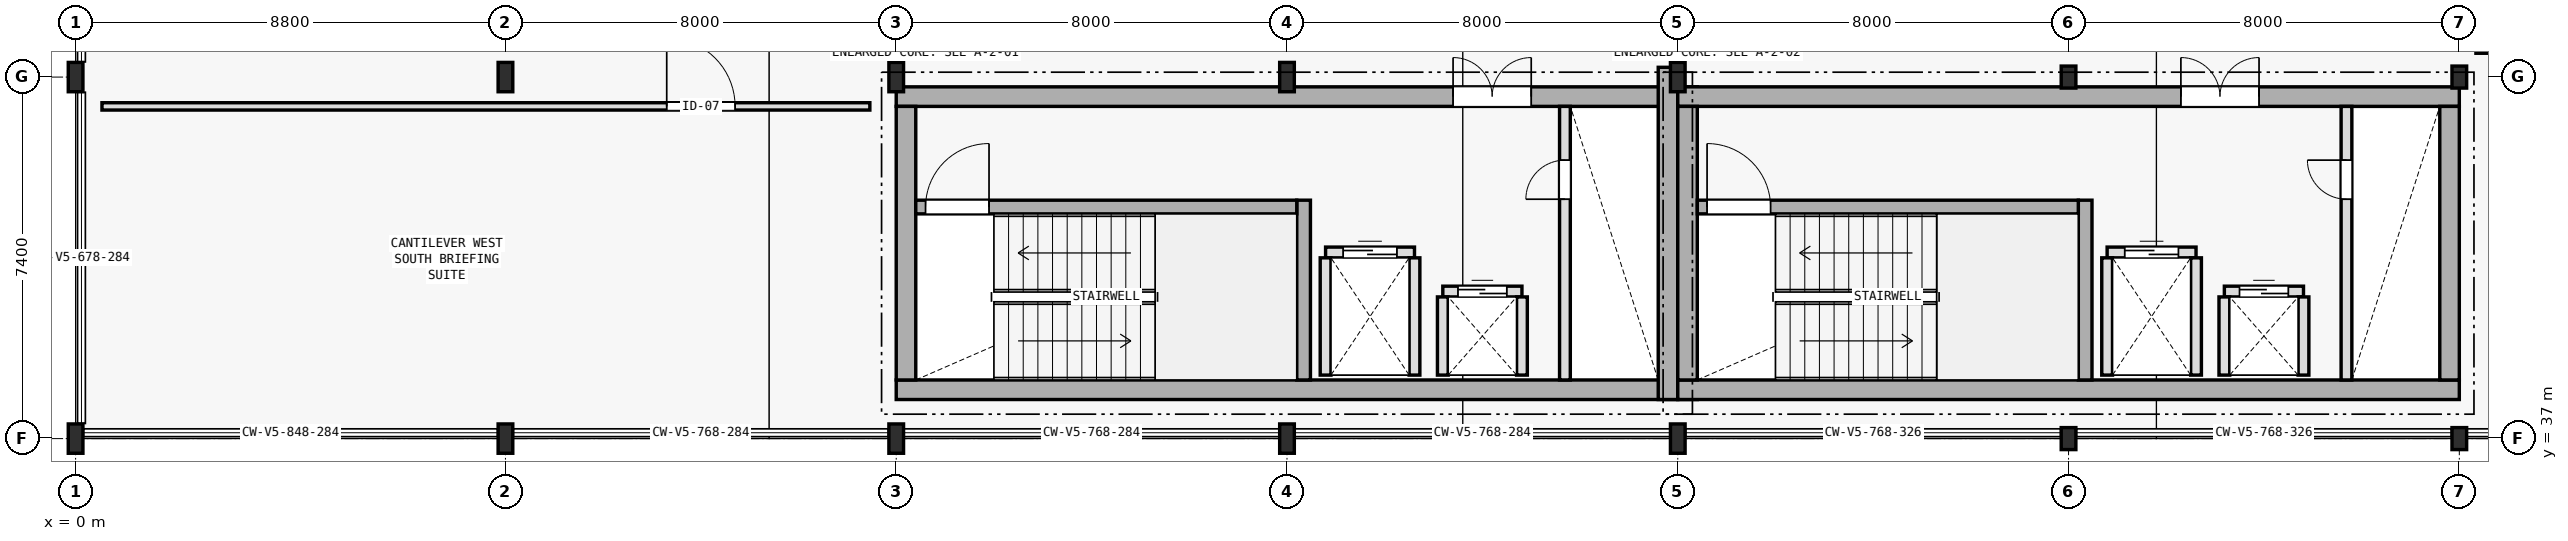
"""IFC4 building model, lengths in metres.
Left out: names, types, materials, properties, quantities, classifications, styles, units other than length and angle.
Written with IfcOpenShell. Run it as: python <this file> out.ifc"""

import sys

from ifc_helpers import new_model, si_unit, direction, frame, frame_2d, origin, origin_2d, place, context, subcontext, project, spatial, rectangle, i_section, extrude, element, fill, save


model = new_model("IFC4")
c1 = context("Model", 3, precision=1e-05, world=origin(), true_north=direction((0.0, 1.0)))
c2 = subcontext(c1, "Body", "Model", "MODEL_VIEW")
j1 = project(units=[si_unit("LENGTHUNIT", "METRE"), si_unit("PLANEANGLEUNIT", "RADIAN")], contexts=[c1])
p1 = place(None, origin())
s1 = spatial("IfcSite", under=j1, at=p1, CompositionType="ELEMENT")
p2 = place(p1, origin())
s2 = spatial("IfcBuilding", under=s1, at=p2, CompositionType="ELEMENT")
p3 = place(p2, frame((0.0, 0.0, 14.1)))
s3 = spatial("IfcBuildingStorey", under=s2, at=p3, CompositionType="ELEMENT", Elevation=14.1)
p4 = place(p3, frame((16.8, 38.0, 0.0), z_axis=(0.0, 0.0, 1.0), x_axis=(1.0, 0.0, 0.0)))
e1 = element("IfcWall", 1, at=p4, inside=s3, PredefinedType="SHEAR", context=c2, shape_type="SweptSolid", body=[
    extrude(rectangle(XDim=16.4, YDim=0.4, at=frame_2d((8.2, 0.0))), origin(), (0.0, 0.0, 1.0), 3.995),
])
p5 = place(p3, frame((16.8, 44.0, 0.0), z_axis=(0.0, 0.0, 1.0), x_axis=(1.0, 0.0, 0.0)))
e2 = element("IfcWall", 2, at=p5, inside=s3, PredefinedType="SHEAR", context=c2, shape_type="SweptSolid", body=[
    extrude(rectangle(XDim=16.4, YDim=0.4, at=frame_2d((8.2, 0.0))), origin(), (0.0, 0.0, 1.0), 3.995),
])
p6 = place(p5, frame((11.4, 0.0, 0.0)))
e3 = element("IfcOpeningElement", 3, at=p6, cuts=e2, PredefinedType="OPENING", context=c2, shape_type="SweptSolid", body=[
    extrude(rectangle(XDim=1.6, YDim=2.2, at=frame_2d((0.8, 1.1))), frame((0.0, 0.21, 0.0), z_axis=(0.0, -1.0, 0.0), x_axis=(1.0, 0.0, 0.0)), (0.0, 0.0, 1.0), 0.42),
])
p7 = place(p3, frame((17.0, 38.2, 0.0), z_axis=(0.0, 0.0, 1.0), x_axis=(0.0, 1.0, 0.0)))
e4 = element("IfcWall", 4, at=p7, inside=s3, PredefinedType="SHEAR", context=c2, shape_type="SweptSolid", body=[
    extrude(rectangle(XDim=5.6, YDim=0.4, at=frame_2d((2.8, 0.0))), origin(), (0.0, 0.0, 1.0), 3.995),
])
p8 = place(p3, frame((32.6, 37.8, 0.0), z_axis=(0.0, 0.0, 1.0), x_axis=(0.0, 1.0, 0.0)))
e5 = element("IfcWall", 5, at=p8, inside=s3, PredefinedType="SHEAR", context=c2, shape_type="SweptSolid", body=[
    extrude(rectangle(XDim=6.8, YDim=0.4, at=frame_2d((3.4, 0.0))), origin(), (0.0, 0.0, 1.0), 3.995),
])
p9 = place(p3, frame((25.14, 38.2, 0.0), z_axis=(0.0, 0.0, 1.0), x_axis=(0.0, 1.0, 0.0)))
e6 = element("IfcWall", 6, at=p9, inside=s3, PredefinedType="SHEAR", context=c2, shape_type="SweptSolid", body=[
    extrude(rectangle(XDim=3.68, YDim=0.28, at=frame_2d((1.84, 0.0))), origin(), (0.0, 0.0, 1.0), 3.995),
])
p10 = place(p3, frame((17.2, 41.74, 0.0), z_axis=(0.0, 0.0, 1.0), x_axis=(1.0, 0.0, 0.0)))
e7 = element("IfcWall", 7, at=p10, inside=s3, PredefinedType="SHEAR", context=c2, shape_type="SweptSolid", body=[
    extrude(rectangle(XDim=7.8, YDim=0.28, at=frame_2d((3.9, 0.0))), origin(), (0.0, 0.0, 1.0), 3.995),
])
p11 = place(p10, frame((0.2, 0.0, 0.0)))
e8 = element("IfcOpeningElement", 8, at=p11, cuts=e7, PredefinedType="OPENING", context=c2, shape_type="SweptSolid", body=[
    extrude(rectangle(XDim=1.3, YDim=2.2, at=frame_2d((0.65, 1.1))), frame((0.0, 0.15, 0.0), z_axis=(0.0, -1.0, 0.0), x_axis=(1.0, 0.0, 0.0)), (0.0, 0.0, 1.0), 0.3),
])
p12 = place(p3, frame((32.8, 38.0, 0.0), z_axis=(0.0, 0.0, 1.0), x_axis=(1.0, 0.0, 0.0)))
e9 = element("IfcWall", 9, at=p12, inside=s3, PredefinedType="SHEAR", context=c2, shape_type="SweptSolid", body=[
    extrude(rectangle(XDim=16.0, YDim=0.4, at=frame_2d((8.0, 0.0))), origin(), (0.0, 0.0, 1.0), 3.995),
])
p13 = place(p3, frame((32.8, 44.0, 0.0), z_axis=(0.0, 0.0, 1.0), x_axis=(1.0, 0.0, 0.0)))
e10 = element("IfcWall", 10, at=p13, inside=s3, PredefinedType="SHEAR", context=c2, shape_type="SweptSolid", body=[
    extrude(rectangle(XDim=16.0, YDim=0.4, at=frame_2d((8.0, 0.0))), origin(), (0.0, 0.0, 1.0), 3.995),
])
p14 = place(p13, frame((10.3, 0.0, 0.0)))
e11 = element("IfcOpeningElement", 11, at=p14, cuts=e10, PredefinedType="OPENING", context=c2, shape_type="SweptSolid", body=[
    extrude(rectangle(XDim=1.6, YDim=2.2, at=frame_2d((0.8, 1.1))), frame((0.0, 0.21, 0.0), z_axis=(0.0, -1.0, 0.0), x_axis=(1.0, 0.0, 0.0)), (0.0, 0.0, 1.0), 0.42),
])
for number, where, z_axis, x_axis in (
    (12, (33.0, 38.2, 0.0), (0.0, 0.0, 1.0), (0.0, 1.0, 0.0)),
    (13, (48.6, 38.2, 0.0), (0.0, 0.0, 1.0), (0.0, 1.0, 0.0)),
):
    element("IfcWall", number, at=place(p3, frame(where, z_axis=z_axis, x_axis=x_axis)), inside=s3, PredefinedType="SHEAR", context=c2, shape_type="SweptSolid", body=[
        extrude(rectangle(XDim=5.6, YDim=0.4, at=frame_2d((2.8, 0.0))), origin(), (0.0, 0.0, 1.0), 3.995),
    ])
p15 = place(p3, frame((41.14, 38.2, 0.0), z_axis=(0.0, 0.0, 1.0), x_axis=(0.0, 1.0, 0.0)))
e14 = element("IfcWall", 14, at=p15, inside=s3, PredefinedType="SHEAR", context=c2, shape_type="SweptSolid", body=[
    extrude(rectangle(XDim=3.68, YDim=0.28, at=frame_2d((1.84, 0.0))), origin(), (0.0, 0.0, 1.0), 3.995),
])
p16 = place(p3, frame((33.2, 41.74, 0.0), z_axis=(0.0, 0.0, 1.0), x_axis=(1.0, 0.0, 0.0)))
e15 = element("IfcWall", 15, at=p16, inside=s3, PredefinedType="SHEAR", context=c2, shape_type="SweptSolid", body=[
    extrude(rectangle(XDim=7.8, YDim=0.28, at=frame_2d((3.9, 0.0))), origin(), (0.0, 0.0, 1.0), 3.995),
])
p17 = place(p16, frame((0.2, 0.0, 0.0)))
e16 = element("IfcOpeningElement", 16, at=p17, cuts=e15, PredefinedType="OPENING", context=c2, shape_type="SweptSolid", body=[
    extrude(rectangle(XDim=1.3, YDim=2.2, at=frame_2d((0.65, 1.1))), frame((0.0, 0.15, 0.0), z_axis=(0.0, -1.0, 0.0), x_axis=(1.0, 0.0, 0.0)), (0.0, 0.0, 1.0), 0.3),
])
for number, where, z_axis, x_axis in (
    (17, (0.0, 37.0, 0.0), (0.0, 0.0, 1.0), (1.0, 0.0, 0.0)),
    (18, (0.0, 44.4, 0.0), (0.0, 0.0, 1.0), (1.0, 0.0, 0.0)),
    (19, (8.8, 37.0, 0.0), (0.0, 0.0, 1.0), (1.0, 0.0, 0.0)),
    (20, (8.8, 44.4, 0.0), (0.0, 0.0, 1.0), (1.0, 0.0, 0.0)),
    (21, (16.8, 37.0, 0.0), (0.0, 0.0, 1.0), (1.0, 0.0, 0.0)),
    (22, (16.8, 44.4, 0.0), (0.0, 0.0, 1.0), (1.0, 0.0, 0.0)),
    (23, (24.8, 37.0, 0.0), (0.0, 0.0, 1.0), (1.0, 0.0, 0.0)),
    (24, (24.8, 44.4, 0.0), (0.0, 0.0, 1.0), (1.0, 0.0, 0.0)),
    (25, (32.8, 37.0, 0.0), (0.0, 0.0, 1.0), (1.0, 0.0, 0.0)),
    (26, (32.8, 44.4, 0.0), (0.0, 0.0, 1.0), (1.0, 0.0, 0.0)),
):
    element("IfcColumn", number, at=place(p3, frame(where, z_axis=z_axis, x_axis=x_axis)), inside=s3, PredefinedType="COLUMN", context=c2, shape_type="SweptSolid", body=[
        extrude(i_section(OverallWidth=0.3, OverallDepth=0.6, WebThickness=0.015, FlangeThickness=0.03, FilletRadius=0.027, at=origin_2d()), origin(), (0.0, 0.0, 1.0), 4.0),
    ])
for number, where, z_axis, x_axis in (
    (27, (40.8, 37.0, 0.0), (0.0, 0.0, 1.0), (1.0, 0.0, 0.0)),
    (28, (40.8, 44.4, 0.0), (0.0, 0.0, 1.0), (1.0, 0.0, 0.0)),
    (29, (48.8, 37.0, 0.0), (0.0, 0.0, 1.0), (1.0, 0.0, 0.0)),
    (30, (48.8, 44.4, 0.0), (0.0, 0.0, 1.0), (1.0, 0.0, 0.0)),
):
    element("IfcColumn", number, at=place(p3, frame(where, z_axis=z_axis, x_axis=x_axis)), inside=s3, PredefinedType="COLUMN", context=c2, shape_type="SweptSolid", body=[
        extrude(i_section(OverallWidth=0.3, OverallDepth=0.45, WebThickness=0.014, FlangeThickness=0.026, FilletRadius=0.027, at=origin_2d()), origin(), (0.0, 0.0, 1.0), 4.0),
    ])
p18 = place(p3, frame((25.59, 40.81, 0.0), z_axis=(0.0, 0.0, 1.0), x_axis=(1.0, 0.0, 0.0)))
e31 = element("IfcWall", 31, at=p18, inside=s3, PredefinedType="PLUMBINGWALL", context=c2, shape_type="SweptSolid", body=[
    extrude(rectangle(XDim=1.82, YDim=0.22, at=frame_2d((0.91, 0.0))), origin(), (0.0, 0.0, 1.0), 3.72),
])
p19 = place(p18, frame((0.36, 0.0, 0.0)))
e32 = element("IfcOpeningElement", 32, at=p19, cuts=e31, PredefinedType="OPENING", context=c2, shape_type="SweptSolid", body=[
    extrude(rectangle(XDim=1.1, YDim=2.2, at=frame_2d((0.55, 1.1))), frame((0.0, 0.12, 0.0), z_axis=(0.0, -1.0, 0.0), x_axis=(1.0, 0.0, 0.0)), (0.0, 0.0, 1.0), 0.24),
])
for number, where, z_axis, x_axis in (
    (33, (25.59, 38.3, 0.0), (0.0, 0.0, 1.0), (0.0, 1.0, 0.0)),
    (34, (27.41, 38.3, 0.0), (0.0, 0.0, 1.0), (0.0, 1.0, 0.0)),
):
    element("IfcWall", number, at=place(p3, frame(where, z_axis=z_axis, x_axis=x_axis)), inside=s3, PredefinedType="PLUMBINGWALL", context=c2, shape_type="SweptSolid", body=[
        extrude(rectangle(XDim=2.4, YDim=0.22, at=frame_2d((1.2, 0.0))), origin(), (0.0, 0.0, 1.0), 3.72),
    ])
p20 = place(p3, frame((27.99, 40.01, 0.0), z_axis=(0.0, 0.0, 1.0), x_axis=(1.0, 0.0, 0.0)))
e35 = element("IfcWall", 35, at=p20, inside=s3, PredefinedType="PLUMBINGWALL", context=c2, shape_type="SweptSolid", body=[
    extrude(rectangle(XDim=1.62, YDim=0.22, at=frame_2d((0.81, 0.0))), origin(), (0.0, 0.0, 1.0), 3.72),
])
p21 = place(p20, frame((0.31, 0.0, 0.0)))
e36 = element("IfcOpeningElement", 36, at=p21, cuts=e35, PredefinedType="OPENING", context=c2, shape_type="SweptSolid", body=[
    extrude(rectangle(XDim=1.0, YDim=2.2, at=frame_2d((0.5, 1.1))), frame((0.0, 0.12, 0.0), z_axis=(0.0, -1.0, 0.0), x_axis=(1.0, 0.0, 0.0)), (0.0, 0.0, 1.0), 0.24),
])
for number, where, z_axis, x_axis in (
    (37, (27.99, 38.3, 0.0), (0.0, 0.0, 1.0), (0.0, 1.0, 0.0)),
    (38, (29.61, 38.3, 0.0), (0.0, 0.0, 1.0), (0.0, 1.0, 0.0)),
):
    element("IfcWall", number, at=place(p3, frame(where, z_axis=z_axis, x_axis=x_axis)), inside=s3, PredefinedType="PLUMBINGWALL", context=c2, shape_type="SweptSolid", body=[
        extrude(rectangle(XDim=1.6, YDim=0.22, at=frame_2d((0.8, 0.0))), origin(), (0.0, 0.0, 1.0), 3.72),
    ])
p22 = place(p3, frame((30.49, 38.2, 0.0), z_axis=(0.0, 0.0, 1.0), x_axis=(0.0, 1.0, 0.0)))
e39 = element("IfcWall", 39, at=p22, inside=s3, PredefinedType="PLUMBINGWALL", context=c2, shape_type="SweptSolid", body=[
    extrude(rectangle(XDim=5.6, YDim=0.22, at=frame_2d((2.8, 0.0))), origin(), (0.0, 0.0, 1.0), 3.72),
])
p23 = place(p22, frame((3.7, 0.0, 0.0)))
e40 = element("IfcOpeningElement", 40, at=p23, cuts=e39, PredefinedType="OPENING", context=c2, shape_type="SweptSolid", body=[
    extrude(rectangle(XDim=0.8, YDim=2.1, at=frame_2d((0.4, 1.05))), frame((0.0, 0.12, 0.0), z_axis=(0.0, -1.0, 0.0), x_axis=(1.0, 0.0, 0.0)), (0.0, 0.0, 1.0), 0.24),
])
p24 = place(p3, frame((41.59, 40.81, 0.0), z_axis=(0.0, 0.0, 1.0), x_axis=(1.0, 0.0, 0.0)))
e41 = element("IfcWall", 41, at=p24, inside=s3, PredefinedType="PLUMBINGWALL", context=c2, shape_type="SweptSolid", body=[
    extrude(rectangle(XDim=1.82, YDim=0.22, at=frame_2d((0.91, 0.0))), origin(), (0.0, 0.0, 1.0), 3.72),
])
p25 = place(p24, frame((0.36, 0.0, 0.0)))
e42 = element("IfcOpeningElement", 42, at=p25, cuts=e41, PredefinedType="OPENING", context=c2, shape_type="SweptSolid", body=[
    extrude(rectangle(XDim=1.1, YDim=2.2, at=frame_2d((0.55, 1.1))), frame((0.0, 0.12, 0.0), z_axis=(0.0, -1.0, 0.0), x_axis=(1.0, 0.0, 0.0)), (0.0, 0.0, 1.0), 0.24),
])
for number, where, z_axis, x_axis in (
    (43, (41.59, 38.3, 0.0), (0.0, 0.0, 1.0), (0.0, 1.0, 0.0)),
    (44, (43.41, 38.3, 0.0), (0.0, 0.0, 1.0), (0.0, 1.0, 0.0)),
):
    element("IfcWall", number, at=place(p3, frame(where, z_axis=z_axis, x_axis=x_axis)), inside=s3, PredefinedType="PLUMBINGWALL", context=c2, shape_type="SweptSolid", body=[
        extrude(rectangle(XDim=2.4, YDim=0.22, at=frame_2d((1.2, 0.0))), origin(), (0.0, 0.0, 1.0), 3.72),
    ])
p26 = place(p3, frame((43.99, 40.01, 0.0), z_axis=(0.0, 0.0, 1.0), x_axis=(1.0, 0.0, 0.0)))
e45 = element("IfcWall", 45, at=p26, inside=s3, PredefinedType="PLUMBINGWALL", context=c2, shape_type="SweptSolid", body=[
    extrude(rectangle(XDim=1.62, YDim=0.22, at=frame_2d((0.81, 0.0))), origin(), (0.0, 0.0, 1.0), 3.72),
])
p27 = place(p26, frame((0.31, 0.0, 0.0)))
e46 = element("IfcOpeningElement", 46, at=p27, cuts=e45, PredefinedType="OPENING", context=c2, shape_type="SweptSolid", body=[
    extrude(rectangle(XDim=1.0, YDim=2.2, at=frame_2d((0.5, 1.1))), frame((0.0, 0.12, 0.0), z_axis=(0.0, -1.0, 0.0), x_axis=(1.0, 0.0, 0.0)), (0.0, 0.0, 1.0), 0.24),
])
for number, where, z_axis, x_axis in (
    (47, (43.99, 38.3, 0.0), (0.0, 0.0, 1.0), (0.0, 1.0, 0.0)),
    (48, (45.61, 38.3, 0.0), (0.0, 0.0, 1.0), (0.0, 1.0, 0.0)),
):
    element("IfcWall", number, at=place(p3, frame(where, z_axis=z_axis, x_axis=x_axis)), inside=s3, PredefinedType="PLUMBINGWALL", context=c2, shape_type="SweptSolid", body=[
        extrude(rectangle(XDim=1.6, YDim=0.22, at=frame_2d((0.8, 0.0))), origin(), (0.0, 0.0, 1.0), 3.72),
    ])
p28 = place(p3, frame((46.49, 38.2, 0.0), z_axis=(0.0, 0.0, 1.0), x_axis=(0.0, 1.0, 0.0)))
e49 = element("IfcWall", 49, at=p28, inside=s3, PredefinedType="PLUMBINGWALL", context=c2, shape_type="SweptSolid", body=[
    extrude(rectangle(XDim=5.6, YDim=0.22, at=frame_2d((2.8, 0.0))), origin(), (0.0, 0.0, 1.0), 3.72),
])
p29 = place(p28, frame((3.7, 0.0, 0.0)))
e50 = element("IfcOpeningElement", 50, at=p29, cuts=e49, PredefinedType="OPENING", context=c2, shape_type="SweptSolid", body=[
    extrude(rectangle(XDim=0.8, YDim=2.1, at=frame_2d((0.4, 1.05))), frame((0.0, 0.12, 0.0), z_axis=(0.0, -1.0, 0.0), x_axis=(1.0, 0.0, 0.0)), (0.0, 0.0, 1.0), 0.24),
])
p30 = place(p3, frame((0.54, 43.8, 0.0), z_axis=(0.0, 0.0, 1.0), x_axis=(1.0, 0.0, 0.0)))
e51 = element("IfcWall", 51, at=p30, inside=s3, PredefinedType="PARTITIONING", context=c2, shape_type="SweptSolid", body=[
    extrude(rectangle(XDim=15.72, YDim=0.15, at=frame_2d((7.86, 0.0))), origin(), (0.0, 0.0, 1.0), 3.245),
])
p31 = place(p30, frame((11.562, 0.0, 0.0)))
e52 = element("IfcOpeningElement", 52, at=p31, cuts=e51, PredefinedType="OPENING", context=c2, shape_type="SweptSolid", body=[
    extrude(rectangle(XDim=1.4, YDim=2.2, at=frame_2d((0.7, 1.1))), frame((0.0, 0.085, 0.0), z_axis=(0.0, -1.0, 0.0), x_axis=(1.0, 0.0, 0.0)), (0.0, 0.0, 1.0), 0.17),
])
p32 = place(p3, frame((49.14, 44.95, 0.0), z_axis=(0.0, 0.0, 1.0), x_axis=(1.0, 0.0, 0.0)))
e53 = element("IfcWall", 53, at=p32, inside=s3, PredefinedType="PARTITIONING", context=c2, shape_type="SweptSolid", body=[
    extrude(rectangle(XDim=3.72, YDim=0.125, at=frame_2d((1.86, 0.0))), origin(), (0.0, 0.0, 1.0), 3.67),
])
p33 = place(p32, frame((1.385, 0.0, 0.0)))
e54 = element("IfcOpeningElement", 54, at=p33, cuts=e53, PredefinedType="OPENING", context=c2, shape_type="SweptSolid", body=[
    extrude(rectangle(XDim=0.95, YDim=2.1, at=frame_2d((0.475, 1.05))), frame((0.0, 0.073, 0.0), z_axis=(0.0, -1.0, 0.0), x_axis=(1.0, 0.0, 0.0)), (0.0, 0.0, 1.0), 0.145),
])
p34 = place(p11, origin())
e55 = element("IfcDoor", 55, at=p34, inside=s3, OperationType="SINGLE_SWING_RIGHT", PredefinedType="DOOR", context=c2, shape_type="SweptSolid", body=[
    extrude(rectangle(XDim=1.3, YDim=2.2, at=frame_2d((0.65, 1.1))), frame((0.0, 0.025, 0.0), z_axis=(0.0, -1.0, 0.0), x_axis=(1.0, 0.0, 0.0)), (0.0, 0.0, 1.0), 0.05),
])
fill(e8, e55)
p35 = place(p19, origin())
e56 = element("IfcDoor", 56, at=p35, inside=s3, OperationType="DOUBLE_DOOR_SLIDING", PredefinedType="DOOR", context=c2, shape_type="SweptSolid", body=[
    extrude(rectangle(XDim=1.1, YDim=2.2, at=frame_2d((0.55, 1.1))), frame((0.0, 0.025, 0.0), z_axis=(0.0, -1.0, 0.0), x_axis=(1.0, 0.0, 0.0)), (0.0, 0.0, 1.0), 0.05),
])
fill(e32, e56)
p36 = place(p21, origin())
e57 = element("IfcDoor", 57, at=p36, inside=s3, OperationType="DOUBLE_DOOR_SLIDING", PredefinedType="DOOR", context=c2, shape_type="SweptSolid", body=[
    extrude(rectangle(XDim=1.0, YDim=2.2, at=frame_2d((0.5, 1.1))), frame((0.0, 0.025, 0.0), z_axis=(0.0, -1.0, 0.0), x_axis=(1.0, 0.0, 0.0)), (0.0, 0.0, 1.0), 0.05),
])
fill(e36, e57)
p37 = place(p23, origin())
e58 = element("IfcDoor", 58, at=p37, inside=s3, OperationType="SINGLE_SWING_LEFT", PredefinedType="DOOR", context=c2, shape_type="SweptSolid", body=[
    extrude(rectangle(XDim=0.8, YDim=2.1, at=frame_2d((0.4, 1.05))), frame((0.0, 0.025, 0.0), z_axis=(0.0, -1.0, 0.0), x_axis=(1.0, 0.0, 0.0)), (0.0, 0.0, 1.0), 0.05),
])
fill(e40, e58)
p38 = place(p6, origin())
e59 = element("IfcDoor", 59, at=p38, inside=s3, OperationType="DOUBLE_DOOR_SINGLE_SWING", PredefinedType="DOOR", context=c2, shape_type="SweptSolid", body=[
    extrude(rectangle(XDim=1.6, YDim=2.2, at=frame_2d((0.8, 1.1))), frame((0.0, 0.025, 0.0), z_axis=(0.0, -1.0, 0.0), x_axis=(1.0, 0.0, 0.0)), (0.0, 0.0, 1.0), 0.05),
])
fill(e3, e59)
p39 = place(p17, origin())
e60 = element("IfcDoor", 60, at=p39, inside=s3, OperationType="SINGLE_SWING_LEFT", PredefinedType="DOOR", context=c2, shape_type="SweptSolid", body=[
    extrude(rectangle(XDim=1.3, YDim=2.2, at=frame_2d((0.65, 1.1))), frame((0.0, 0.025, 0.0), z_axis=(0.0, -1.0, 0.0), x_axis=(1.0, 0.0, 0.0)), (0.0, 0.0, 1.0), 0.05),
])
fill(e16, e60)
p40 = place(p25, origin())
e61 = element("IfcDoor", 61, at=p40, inside=s3, OperationType="DOUBLE_DOOR_SLIDING", PredefinedType="DOOR", context=c2, shape_type="SweptSolid", body=[
    extrude(rectangle(XDim=1.1, YDim=2.2, at=frame_2d((0.55, 1.1))), frame((0.0, 0.025, 0.0), z_axis=(0.0, -1.0, 0.0), x_axis=(1.0, 0.0, 0.0)), (0.0, 0.0, 1.0), 0.05),
])
fill(e42, e61)
p41 = place(p27, origin())
e62 = element("IfcDoor", 62, at=p41, inside=s3, OperationType="DOUBLE_DOOR_SLIDING", PredefinedType="DOOR", context=c2, shape_type="SweptSolid", body=[
    extrude(rectangle(XDim=1.0, YDim=2.2, at=frame_2d((0.5, 1.1))), frame((0.0, 0.025, 0.0), z_axis=(0.0, -1.0, 0.0), x_axis=(1.0, 0.0, 0.0)), (0.0, 0.0, 1.0), 0.05),
])
fill(e46, e62)
p42 = place(p29, origin())
e63 = element("IfcDoor", 63, at=p42, inside=s3, OperationType="SINGLE_SWING_RIGHT", PredefinedType="DOOR", context=c2, shape_type="SweptSolid", body=[
    extrude(rectangle(XDim=0.8, YDim=2.1, at=frame_2d((0.4, 1.05))), frame((0.0, 0.025, 0.0), z_axis=(0.0, -1.0, 0.0), x_axis=(1.0, 0.0, 0.0)), (0.0, 0.0, 1.0), 0.05),
])
fill(e50, e63)
p43 = place(p14, origin())
e64 = element("IfcDoor", 64, at=p43, inside=s3, OperationType="DOUBLE_DOOR_SINGLE_SWING", PredefinedType="DOOR", context=c2, shape_type="SweptSolid", body=[
    extrude(rectangle(XDim=1.6, YDim=2.2, at=frame_2d((0.8, 1.1))), frame((0.0, 0.025, 0.0), z_axis=(0.0, -1.0, 0.0), x_axis=(1.0, 0.0, 0.0)), (0.0, 0.0, 1.0), 0.05),
])
fill(e11, e64)
p44 = place(p31, origin())
e65 = element("IfcDoor", 65, at=p44, inside=s3, OperationType="SINGLE_SWING_LEFT", PredefinedType="DOOR", context=c2, shape_type="SweptSolid", body=[
    extrude(rectangle(XDim=1.4, YDim=2.2, at=frame_2d((0.7, 1.1))), frame((0.0, 0.025, 0.0), z_axis=(0.0, -1.0, 0.0), x_axis=(1.0, 0.0, 0.0)), (0.0, 0.0, 1.0), 0.05),
])
fill(e52, e65)
save(model, sys.argv[1])
